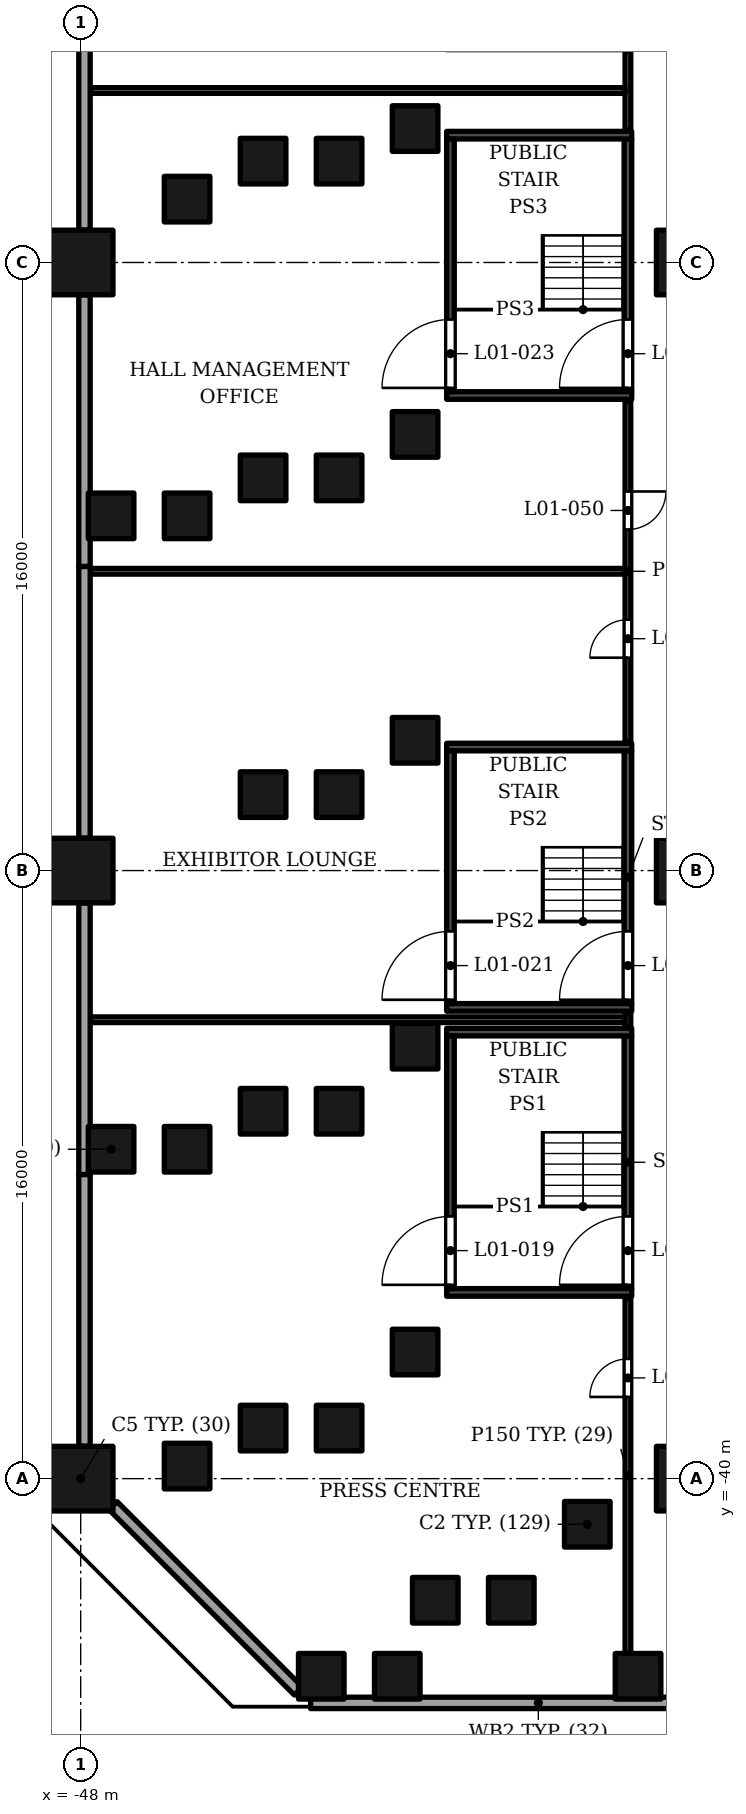
"""IFC4 building model, lengths in metres.
Left out: names, types, materials, properties, quantities, classifications, styles, units other than length and angle.
Written with IfcOpenShell. Run it as: python <this file> out.ifc"""

import sys

from ifc_helpers import new_model, si_unit, direction, frame, frame_2d, origin, origin_2d, place, context, subcontext, project, spatial, rectangle, extrude, element, fill, save


model = new_model("IFC4")
c1 = context("Model", 3, precision=1e-05, world=origin(), true_north=direction((0.0, 1.0)))
c2 = subcontext(c1, "Body", "Model", "MODEL_VIEW")
j1 = project(units=[si_unit("LENGTHUNIT", "METRE"), si_unit("PLANEANGLEUNIT", "RADIAN")], contexts=[c1])
p1 = place(None, origin())
s1 = spatial("IfcSite", under=j1, at=p1, CompositionType="ELEMENT")
p2 = place(p1, origin())
s2 = spatial("IfcBuilding", under=s1, at=p2, CompositionType="ELEMENT")
p3 = place(p2, frame((0.0, 0.0, 9.0)))
s3 = spatial("IfcBuildingStorey", under=s2, at=p3, CompositionType="ELEMENT", Elevation=9.0)
for number, where, z_axis, x_axis in (
    (1, (-48.0, -40.0, 0.0), (0.0, 0.0, 1.0), (1.0, 0.0, 0.0)),
    (2, (-48.0, -24.0, 0.0), (0.0, 0.0, 1.0), (1.0, 0.0, 0.0)),
    (3, (-48.0, -8.0, 0.0), (0.0, 0.0, 1.0), (1.0, 0.0, 0.0)),
    (4, (-32.0, -40.0, 0.0), (0.0, 0.0, 1.0), (1.0, 0.0, 0.0)),
    (5, (-32.0, -24.0, 0.0), (0.0, 0.0, 1.0), (1.0, 0.0, 0.0)),
    (6, (-32.0, -8.0, 0.0), (0.0, 0.0, 1.0), (1.0, 0.0, 0.0)),
):
    element("IfcColumn", number, at=place(p3, frame(where, z_axis=z_axis, x_axis=x_axis)), inside=s3, PredefinedType="COLUMN", context=c2, shape_type="SweptSolid", body=[
        extrude(rectangle(XDim=1.7, YDim=1.7, at=origin_2d()), origin(), (0.0, 0.0, 1.0), 11.0),
    ])
for number, where, z_axis, x_axis in (
    (7, (-34.669, -41.2, 0.0), (0.0, 0.0, 1.0), (1.0, 0.0, 0.0)),
    (8, (-39.2, -36.669, 0.0), (0.0, 0.0, 1.0), (1.0, 0.0, 0.0)),
    (9, (-39.2, -28.62, 0.0), (0.0, 0.0, 1.0), (1.0, 0.0, 0.0)),
    (10, (-39.2, -20.572, 0.0), (0.0, 0.0, 1.0), (1.0, 0.0, 0.0)),
    (11, (-39.2, -12.524, 0.0), (0.0, 0.0, 1.0), (1.0, 0.0, 0.0)),
    (12, (-39.2, -4.476, 0.0), (0.0, 0.0, 1.0), (1.0, 0.0, 0.0)),
    (13, (-36.669, -43.2, 0.0), (0.0, 0.0, 1.0), (1.0, 0.0, 0.0)),
    (14, (-41.2, -38.669, 0.0), (0.0, 0.0, 1.0), (1.0, 0.0, 0.0)),
    (15, (-41.2, -30.333, 0.0), (0.0, 0.0, 1.0), (1.0, 0.0, 0.0)),
    (16, (-41.2, -22.001, 0.0), (0.0, 0.0, 1.0), (1.0, 0.0, 0.0)),
    (17, (-41.2, -13.667, 0.0), (0.0, 0.0, 1.0), (1.0, 0.0, 0.0)),
    (18, (-41.2, -5.333, 0.0), (0.0, 0.0, 1.0), (1.0, 0.0, 0.0)),
    (19, (-38.669, -43.2, 0.0), (0.0, 0.0, 1.0), (1.0, 0.0, 0.0)),
    (20, (-43.2, -38.669, 0.0), (0.0, 0.0, 1.0), (1.0, 0.0, 0.0)),
    (21, (-43.2, -30.333, 0.0), (0.0, 0.0, 1.0), (1.0, 0.0, 0.0)),
    (22, (-43.2, -22.001, 0.0), (0.0, 0.0, 1.0), (1.0, 0.0, 0.0)),
    (23, (-43.2, -13.667, 0.0), (0.0, 0.0, 1.0), (1.0, 0.0, 0.0)),
    (24, (-43.2, -5.333, 0.0), (0.0, 0.0, 1.0), (1.0, 0.0, 0.0)),
    (25, (-39.669, -45.2, 0.0), (0.0, 0.0, 1.0), (1.0, 0.0, 0.0)),
    (26, (-45.2, -39.669, 0.0), (0.0, 0.0, 1.0), (1.0, 0.0, 0.0)),
    (27, (-45.2, -31.333, 0.0), (0.0, 0.0, 1.0), (1.0, 0.0, 0.0)),
    (28, (-45.2, -14.667, 0.0), (0.0, 0.0, 1.0), (1.0, 0.0, 0.0)),
    (29, (-45.2, -6.333, 0.0), (0.0, 0.0, 1.0), (1.0, 0.0, 0.0)),
    (30, (-41.669, -45.2, 0.0), (0.0, 0.0, 1.0), (1.0, 0.0, 0.0)),
    (31, (-47.2, -31.333, 0.0), (0.0, 0.0, 1.0), (1.0, 0.0, 0.0)),
    (32, (-47.2, -14.667, 0.0), (0.0, 0.0, 1.0), (1.0, 0.0, 0.0)),
    (33, (-33.333, -45.2, 0.0), (0.0, 0.0, 1.0), (1.0, 0.0, 0.0)),
):
    element("IfcColumn", number, at=place(p3, frame(where, z_axis=z_axis, x_axis=x_axis)), inside=s3, PredefinedType="COLUMN", context=c2, shape_type="SweptSolid", body=[
        extrude(rectangle(XDim=1.2, YDim=1.2, at=origin_2d()), origin(), (0.0, 0.0, 1.0), 11.0),
    ])
p4 = place(p3, frame((-41.95, -45.9, 0.0), z_axis=(0.0, 0.0, 1.0), x_axis=(1.0, 0.0, 0.0)))
e34 = element("IfcWall", 34, at=p4, inside=s3, PredefinedType="SOLIDWALL", context=c2, shape_type="SweptSolid", body=[
    extrude(rectangle(XDim=11.986, YDim=0.3, at=frame_2d((5.993, 0.0))), origin(), (0.0, 0.0, 1.0), 9.6),
])
for number, where, z_axis, x_axis in (
    (35, (-47.9, 0.0, 0.0), (0.0, 0.0, 1.0), (0.0, -1.0, 0.0)),
    (36, (-47.9, -8.852, 0.0), (0.0, 0.0, 1.0), (0.0, -1.0, 0.0)),
    (37, (-47.9, -16.0, 0.0), (0.0, 0.0, 1.0), (0.0, -1.0, 0.0)),
    (38, (-47.9, -24.852, 0.0), (0.0, 0.0, 1.0), (0.0, -1.0, 0.0)),
    (39, (-47.9, -32.0, 0.0), (0.0, 0.0, 1.0), (0.0, -1.0, 0.0)),
):
    element("IfcWall", number, at=place(p3, frame(where, z_axis=z_axis, x_axis=x_axis)), inside=s3, PredefinedType="SOLIDWALL", context=c2, shape_type="SweptSolid", body=[
        extrude(rectangle(XDim=7.148, YDim=0.3, at=frame_2d((3.574, 0.0))), origin(), (0.0, 0.0, 1.0), 9.6),
    ])
p5 = place(p3, frame((-47.148, -40.711, 0.0), z_axis=(0.0, 0.0, 1.0), x_axis=(0.707106781187, -0.707106781187, 0.0)))
e40 = element("IfcWall", 40, at=p5, inside=s3, PredefinedType="SOLIDWALL", context=c2, shape_type="SweptSolid", body=[
    extrude(rectangle(XDim=6.897, YDim=0.3, at=frame_2d((3.448, 0.0))), origin(), (0.0, 0.0, 1.0), 9.6),
])
p6 = place(p3, frame((-42.0, -45.85, 11.0), z_axis=(0.0, 0.0, 1.0), x_axis=(1.0, 0.0, 0.0)))
e41 = element("IfcWall", 41, at=p6, inside=s3, PredefinedType="PARAPET", context=c2, shape_type="SweptSolid", body=[
    extrude(rectangle(XDim=1.25, YDim=0.3, at=frame_2d((0.625, 0.0))), origin(), (0.0, 0.0, 1.0), 1.1),
])
for number, where, z_axis, x_axis in (
    (42, (-47.85, 4.093, 11.0), (0.0, 0.0, 1.0), (0.0, -1.0, 0.0)),
    (43, (-47.85, -10.605, 11.0), (0.0, 0.0, 1.0), (0.0, -1.0, 0.0)),
    (44, (-47.85, -25.302, 11.0), (0.0, 0.0, 1.0), (0.0, -1.0, 0.0)),
):
    element("IfcWall", number, at=place(p3, frame(where, z_axis=z_axis, x_axis=x_axis)), inside=s3, PredefinedType="PARAPET", context=c2, shape_type="SweptSolid", body=[
        extrude(rectangle(XDim=14.698, YDim=0.3, at=frame_2d((7.349, 0.0))), origin(), (0.0, 0.0, 1.0), 1.1),
    ])
p7 = place(p3, frame((-47.745, -40.042, 11.0), z_axis=(0.0, 0.0, 1.0), x_axis=(0.707092029666, -0.7071215324, 0.0)))
e45 = element("IfcWall", 45, at=p7, inside=s3, PredefinedType="PARAPET", context=c2, shape_type="SweptSolid", body=[
    extrude(rectangle(XDim=8.275, YDim=0.3, at=frame_2d((4.138, 0.0))), origin(), (0.0, 0.0, 1.0), 1.1),
])
for number, where, z_axis, x_axis in (
    (46, (-38.37, -35.1, 0.0), (0.0, 0.0, 1.0), (1.0, 0.0, 0.0)),
    (47, (-38.37, -28.25, 0.0), (0.0, 0.0, 1.0), (1.0, 0.0, 0.0)),
):
    element("IfcWall", number, at=place(p3, frame(where, z_axis=z_axis, x_axis=x_axis)), inside=s3, PredefinedType="SOLIDWALL", context=c2, shape_type="SweptSolid", body=[
        extrude(rectangle(XDim=4.87, YDim=0.2, at=frame_2d((2.435, 0.0))), origin(), (0.0, 0.0, 1.0), 10.5),
    ])
p8 = place(p3, frame((-38.27, -35.0, 0.0), z_axis=(0.0, 0.0, 1.0), x_axis=(0.0, 1.0, 0.0)))
e48 = element("IfcWall", 48, at=p8, inside=s3, PredefinedType="SOLIDWALL", context=c2, shape_type="SweptSolid", body=[
    extrude(rectangle(XDim=6.65, YDim=0.2, at=frame_2d((3.325, 0.0))), origin(), (0.0, 0.0, 1.0), 10.5),
])
p9 = place(p8, frame((0.1, 0.0, 0.0)))
e49 = element("IfcOpeningElement", 49, at=p9, cuts=e48, PredefinedType="OPENING", context=c2, shape_type="SweptSolid", body=[
    extrude(rectangle(XDim=1.8, YDim=2.4, at=frame_2d((0.9, 1.2))), frame((0.0, 0.11, 0.0), z_axis=(0.0, -1.0, 0.0), x_axis=(1.0, 0.0, 0.0)), (0.0, 0.0, 1.0), 0.22),
])
p10 = place(p3, frame((-33.6, -35.0, 0.0), z_axis=(0.0, 0.0, 1.0), x_axis=(0.0, 1.0, 0.0)))
e50 = element("IfcWall", 50, at=p10, inside=s3, PredefinedType="SOLIDWALL", context=c2, shape_type="SweptSolid", body=[
    extrude(rectangle(XDim=6.65, YDim=0.2, at=frame_2d((3.325, 0.0))), origin(), (0.0, 0.0, 1.0), 10.5),
])
p11 = place(p10, frame((0.1, 0.0, 0.0)))
e51 = element("IfcOpeningElement", 51, at=p11, cuts=e50, PredefinedType="OPENING", context=c2, shape_type="SweptSolid", body=[
    extrude(rectangle(XDim=1.8, YDim=2.4, at=frame_2d((0.9, 1.2))), frame((0.0, 0.11, 0.0), z_axis=(0.0, -1.0, 0.0), x_axis=(1.0, 0.0, 0.0)), (0.0, 0.0, 1.0), 0.22),
])
for number, where, z_axis, x_axis in (
    (52, (-38.37, -27.6, 0.0), (0.0, 0.0, 1.0), (1.0, 0.0, 0.0)),
    (53, (-38.37, -20.75, 0.0), (0.0, 0.0, 1.0), (1.0, 0.0, 0.0)),
):
    element("IfcWall", number, at=place(p3, frame(where, z_axis=z_axis, x_axis=x_axis)), inside=s3, PredefinedType="SOLIDWALL", context=c2, shape_type="SweptSolid", body=[
        extrude(rectangle(XDim=4.87, YDim=0.2, at=frame_2d((2.435, 0.0))), origin(), (0.0, 0.0, 1.0), 10.5),
    ])
p12 = place(p3, frame((-38.27, -27.5, 0.0), z_axis=(0.0, 0.0, 1.0), x_axis=(0.0, 1.0, 0.0)))
e54 = element("IfcWall", 54, at=p12, inside=s3, PredefinedType="SOLIDWALL", context=c2, shape_type="SweptSolid", body=[
    extrude(rectangle(XDim=6.65, YDim=0.2, at=frame_2d((3.325, 0.0))), origin(), (0.0, 0.0, 1.0), 10.5),
])
p13 = place(p12, frame((0.1, 0.0, 0.0)))
e55 = element("IfcOpeningElement", 55, at=p13, cuts=e54, PredefinedType="OPENING", context=c2, shape_type="SweptSolid", body=[
    extrude(rectangle(XDim=1.8, YDim=2.4, at=frame_2d((0.9, 1.2))), frame((0.0, 0.11, 0.0), z_axis=(0.0, -1.0, 0.0), x_axis=(1.0, 0.0, 0.0)), (0.0, 0.0, 1.0), 0.22),
])
p14 = place(p3, frame((-33.6, -27.5, 0.0), z_axis=(0.0, 0.0, 1.0), x_axis=(0.0, 1.0, 0.0)))
e56 = element("IfcWall", 56, at=p14, inside=s3, PredefinedType="SOLIDWALL", context=c2, shape_type="SweptSolid", body=[
    extrude(rectangle(XDim=6.65, YDim=0.2, at=frame_2d((3.325, 0.0))), origin(), (0.0, 0.0, 1.0), 10.5),
])
p15 = place(p14, frame((0.1, 0.0, 0.0)))
e57 = element("IfcOpeningElement", 57, at=p15, cuts=e56, PredefinedType="OPENING", context=c2, shape_type="SweptSolid", body=[
    extrude(rectangle(XDim=1.8, YDim=2.4, at=frame_2d((0.9, 1.2))), frame((0.0, 0.11, 0.0), z_axis=(0.0, -1.0, 0.0), x_axis=(1.0, 0.0, 0.0)), (0.0, 0.0, 1.0), 0.22),
])
for number, where, z_axis, x_axis in (
    (58, (-38.37, -11.5, 0.0), (0.0, 0.0, 1.0), (1.0, 0.0, 0.0)),
    (59, (-38.37, -4.65, 0.0), (0.0, 0.0, 1.0), (1.0, 0.0, 0.0)),
):
    element("IfcWall", number, at=place(p3, frame(where, z_axis=z_axis, x_axis=x_axis)), inside=s3, PredefinedType="SOLIDWALL", context=c2, shape_type="SweptSolid", body=[
        extrude(rectangle(XDim=4.87, YDim=0.2, at=frame_2d((2.435, 0.0))), origin(), (0.0, 0.0, 1.0), 10.5),
    ])
p16 = place(p3, frame((-38.27, -11.4, 0.0), z_axis=(0.0, 0.0, 1.0), x_axis=(0.0, 1.0, 0.0)))
e60 = element("IfcWall", 60, at=p16, inside=s3, PredefinedType="SOLIDWALL", context=c2, shape_type="SweptSolid", body=[
    extrude(rectangle(XDim=6.65, YDim=0.2, at=frame_2d((3.325, 0.0))), origin(), (0.0, 0.0, 1.0), 10.5),
])
p17 = place(p16, frame((0.1, 0.0, 0.0)))
e61 = element("IfcOpeningElement", 61, at=p17, cuts=e60, PredefinedType="OPENING", context=c2, shape_type="SweptSolid", body=[
    extrude(rectangle(XDim=1.8, YDim=2.4, at=frame_2d((0.9, 1.2))), frame((0.0, 0.11, 0.0), z_axis=(0.0, -1.0, 0.0), x_axis=(1.0, 0.0, 0.0)), (0.0, 0.0, 1.0), 0.22),
])
p18 = place(p3, frame((-33.6, -11.4, 0.0), z_axis=(0.0, 0.0, 1.0), x_axis=(0.0, 1.0, 0.0)))
e62 = element("IfcWall", 62, at=p18, inside=s3, PredefinedType="SOLIDWALL", context=c2, shape_type="SweptSolid", body=[
    extrude(rectangle(XDim=6.65, YDim=0.2, at=frame_2d((3.325, 0.0))), origin(), (0.0, 0.0, 1.0), 10.5),
])
p19 = place(p18, frame((0.1, 0.0, 0.0)))
e63 = element("IfcOpeningElement", 63, at=p19, cuts=e62, PredefinedType="OPENING", context=c2, shape_type="SweptSolid", body=[
    extrude(rectangle(XDim=1.8, YDim=2.4, at=frame_2d((0.9, 1.2))), frame((0.0, 0.11, 0.0), z_axis=(0.0, -1.0, 0.0), x_axis=(1.0, 0.0, 0.0)), (0.0, 0.0, 1.0), 0.22),
])
p20 = place(p3, frame((-33.6, -44.6, 0.0), z_axis=(0.0, 0.0, 1.0), x_axis=(0.0, 1.0, 0.0)))
e64 = element("IfcWall", 64, at=p20, inside=s3, PredefinedType="PARTITIONING", context=c2, shape_type="SweptSolid", body=[
    extrude(rectangle(XDim=9.36, YDim=0.15, at=frame_2d((4.68, 0.0))), origin(), (0.0, 0.0, 1.0), 9.3),
])
p21 = place(p20, frame((6.75, 0.0, 0.0)))
e65 = element("IfcOpeningElement", 65, at=p21, cuts=e64, PredefinedType="OPENING", context=c2, shape_type="SweptSolid", body=[
    extrude(rectangle(XDim=1.0, YDim=2.1, at=frame_2d((0.5, 1.05))), frame((0.0, 0.085, 0.0), z_axis=(0.0, -1.0, 0.0), x_axis=(1.0, 0.0, 0.0)), (0.0, 0.0, 1.0), 0.17),
])
p22 = place(p3, frame((-33.6, -28.11, 0.0), z_axis=(0.0, 0.0, 1.0), x_axis=(0.0, 1.0, 0.0)))
e66 = element("IfcWall", 66, at=p22, inside=s3, PredefinedType="PARTITIONING", context=c2, shape_type="SweptSolid", body=[
    extrude(rectangle(XDim=0.37, YDim=0.15, at=frame_2d((0.185, 0.0))), origin(), (0.0, 0.0, 1.0), 10.5),
])
p23 = place(p3, frame((-47.72, -27.925, 0.0), z_axis=(0.0, 0.0, 1.0), x_axis=(1.0, 0.0, 0.0)))
e67 = element("IfcWall", 67, at=p23, inside=s3, PredefinedType="PARTITIONING", context=c2, shape_type="SweptSolid", body=[
    extrude(rectangle(XDim=14.045, YDim=0.15, at=frame_2d((7.022, 0.0))), origin(), (0.0, 0.0, 1.0), 9.6),
])
p24 = place(p3, frame((-33.6, -20.61, 0.0), z_axis=(0.0, 0.0, 1.0), x_axis=(0.0, 1.0, 0.0)))
e68 = element("IfcWall", 68, at=p24, inside=s3, PredefinedType="PARTITIONING", context=c2, shape_type="SweptSolid", body=[
    extrude(rectangle(XDim=8.97, YDim=0.15, at=frame_2d((4.485, 0.0))), origin(), (0.0, 0.0, 1.0), 10.5),
])
p25 = place(p24, frame((2.211, 0.0, 0.0)))
e69 = element("IfcOpeningElement", 69, at=p25, cuts=e68, PredefinedType="OPENING", context=c2, shape_type="SweptSolid", body=[
    extrude(rectangle(XDim=1.0, YDim=2.1, at=frame_2d((0.5, 1.05))), frame((0.0, 0.085, 0.0), z_axis=(0.0, -1.0, 0.0), x_axis=(1.0, 0.0, 0.0)), (0.0, 0.0, 1.0), 0.17),
])
p26 = place(p24, frame((5.585, 0.0, 0.0)))
e70 = element("IfcOpeningElement", 70, at=p26, cuts=e68, PredefinedType="OPENING", context=c2, shape_type="SweptSolid", body=[
    extrude(rectangle(XDim=1.0, YDim=2.1, at=frame_2d((0.5, 1.05))), frame((0.0, 0.085, 0.0), z_axis=(0.0, -1.0, 0.0), x_axis=(1.0, 0.0, 0.0)), (0.0, 0.0, 1.0), 0.17),
])
p27 = place(p3, frame((-47.72, -16.125, 0.0), z_axis=(0.0, 0.0, 1.0), x_axis=(1.0, 0.0, 0.0)))
e71 = element("IfcWall", 71, at=p27, inside=s3, PredefinedType="PARTITIONING", context=c2, shape_type="SweptSolid", body=[
    extrude(rectangle(XDim=14.045, YDim=0.15, at=frame_2d((7.022, 0.0))), origin(), (0.0, 0.0, 1.0), 9.6),
])
p28 = place(p3, frame((-33.6, -4.51, 0.0), z_axis=(0.0, 0.0, 1.0), x_axis=(0.0, 1.0, 0.0)))
e72 = element("IfcWall", 72, at=p28, inside=s3, PredefinedType="PARTITIONING", context=c2, shape_type="SweptSolid", body=[
    extrude(rectangle(XDim=2.07, YDim=0.15, at=frame_2d((1.035, 0.0))), origin(), (0.0, 0.0, 1.0), 10.5),
])
p29 = place(p3, frame((-47.72, -3.475, 0.0), z_axis=(0.0, 0.0, 1.0), x_axis=(1.0, 0.0, 0.0)))
e73 = element("IfcWall", 73, at=p29, inside=s3, PredefinedType="PARTITIONING", context=c2, shape_type="SweptSolid", body=[
    extrude(rectangle(XDim=14.045, YDim=0.15, at=frame_2d((7.022, 0.0))), origin(), (0.0, 0.0, 1.0), 9.6),
])
p30 = place(p11, origin())
e74 = element("IfcDoor", 74, at=p30, inside=s3, OperationType="DOUBLE_DOOR_SINGLE_SWING", PredefinedType="DOOR", context=c2, shape_type="SweptSolid", body=[
    extrude(rectangle(XDim=1.8, YDim=2.4, at=frame_2d((0.9, 1.2))), frame((0.0, 0.025, 0.0), z_axis=(0.0, -1.0, 0.0), x_axis=(1.0, 0.0, 0.0)), (0.0, 0.0, 1.0), 0.05),
])
fill(e51, e74)
p31 = place(p9, origin())
e75 = element("IfcDoor", 75, at=p31, inside=s3, OperationType="DOUBLE_DOOR_SINGLE_SWING", PredefinedType="DOOR", context=c2, shape_type="SweptSolid", body=[
    extrude(rectangle(XDim=1.8, YDim=2.4, at=frame_2d((0.9, 1.2))), frame((0.0, 0.025, 0.0), z_axis=(0.0, -1.0, 0.0), x_axis=(1.0, 0.0, 0.0)), (0.0, 0.0, 1.0), 0.05),
])
fill(e49, e75)
p32 = place(p15, origin())
e76 = element("IfcDoor", 76, at=p32, inside=s3, OperationType="DOUBLE_DOOR_SINGLE_SWING", PredefinedType="DOOR", context=c2, shape_type="SweptSolid", body=[
    extrude(rectangle(XDim=1.8, YDim=2.4, at=frame_2d((0.9, 1.2))), frame((0.0, 0.025, 0.0), z_axis=(0.0, -1.0, 0.0), x_axis=(1.0, 0.0, 0.0)), (0.0, 0.0, 1.0), 0.05),
])
fill(e57, e76)
p33 = place(p13, origin())
e77 = element("IfcDoor", 77, at=p33, inside=s3, OperationType="DOUBLE_DOOR_SINGLE_SWING", PredefinedType="DOOR", context=c2, shape_type="SweptSolid", body=[
    extrude(rectangle(XDim=1.8, YDim=2.4, at=frame_2d((0.9, 1.2))), frame((0.0, 0.025, 0.0), z_axis=(0.0, -1.0, 0.0), x_axis=(1.0, 0.0, 0.0)), (0.0, 0.0, 1.0), 0.05),
])
fill(e55, e77)
p34 = place(p19, origin())
e78 = element("IfcDoor", 78, at=p34, inside=s3, OperationType="DOUBLE_DOOR_SINGLE_SWING", PredefinedType="DOOR", context=c2, shape_type="SweptSolid", body=[
    extrude(rectangle(XDim=1.8, YDim=2.4, at=frame_2d((0.9, 1.2))), frame((0.0, 0.025, 0.0), z_axis=(0.0, -1.0, 0.0), x_axis=(1.0, 0.0, 0.0)), (0.0, 0.0, 1.0), 0.05),
])
fill(e63, e78)
p35 = place(p17, origin())
e79 = element("IfcDoor", 79, at=p35, inside=s3, OperationType="DOUBLE_DOOR_SINGLE_SWING", PredefinedType="DOOR", context=c2, shape_type="SweptSolid", body=[
    extrude(rectangle(XDim=1.8, YDim=2.4, at=frame_2d((0.9, 1.2))), frame((0.0, 0.025, 0.0), z_axis=(0.0, -1.0, 0.0), x_axis=(1.0, 0.0, 0.0)), (0.0, 0.0, 1.0), 0.05),
])
fill(e61, e79)
p36 = place(p21, origin())
e80 = element("IfcDoor", 80, at=p36, inside=s3, OperationType="SINGLE_SWING_LEFT", PredefinedType="DOOR", context=c2, shape_type="SweptSolid", body=[
    extrude(rectangle(XDim=1.0, YDim=2.1, at=frame_2d((0.5, 1.05))), frame((0.0, 0.025, 0.0), z_axis=(0.0, -1.0, 0.0), x_axis=(1.0, 0.0, 0.0)), (0.0, 0.0, 1.0), 0.05),
])
fill(e65, e80)
p37 = place(p25, origin())
e81 = element("IfcDoor", 81, at=p37, inside=s3, OperationType="SINGLE_SWING_LEFT", PredefinedType="DOOR", context=c2, shape_type="SweptSolid", body=[
    extrude(rectangle(XDim=1.0, YDim=2.1, at=frame_2d((0.5, 1.05))), frame((0.0, 0.025, 0.0), z_axis=(0.0, -1.0, 0.0), x_axis=(1.0, 0.0, 0.0)), (0.0, 0.0, 1.0), 0.05),
])
fill(e69, e81)
p38 = place(p26, origin())
e82 = element("IfcDoor", 82, at=p38, inside=s3, OperationType="SINGLE_SWING_RIGHT", PredefinedType="DOOR", context=c2, shape_type="SweptSolid", body=[
    extrude(rectangle(XDim=1.0, YDim=2.1, at=frame_2d((0.5, 1.05))), frame((0.0, 0.025, 0.0), z_axis=(0.0, -1.0, 0.0), x_axis=(1.0, 0.0, 0.0)), (0.0, 0.0, 1.0), 0.05),
])
fill(e70, e82)
save(model, sys.argv[1])
